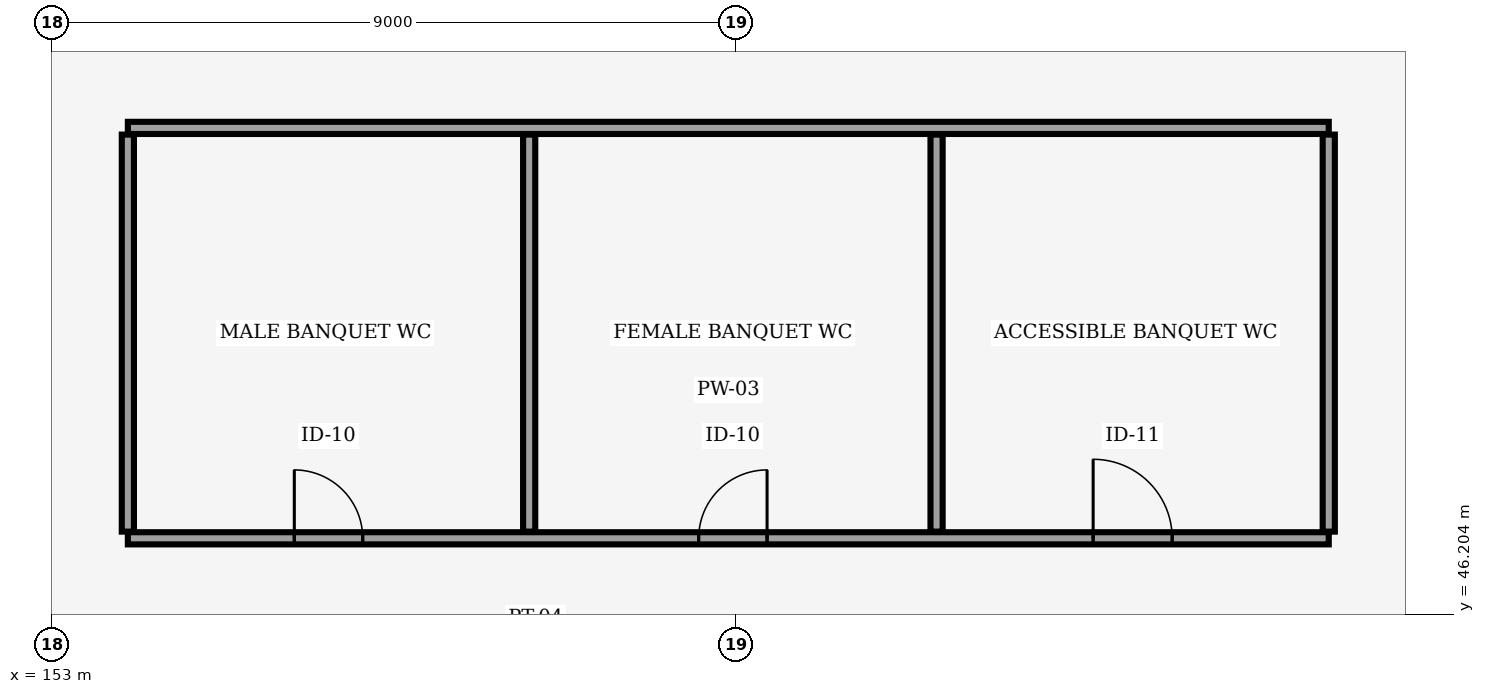
"""IFC4 building model, lengths in metres.
Left out: names, types, materials, properties, quantities, classifications, styles, units other than length and angle.
Written with IfcOpenShell. Run it as: python <this file> out.ifc"""

import sys

from ifc_helpers import new_model, si_unit, direction, frame, frame_2d, origin, place, context, subcontext, project, spatial, rectangle, extrude, element, fill, save


model = new_model("IFC4")
c1 = context("Model", 3, precision=1e-05, world=origin(), true_north=direction((0.0, 1.0)))
c2 = subcontext(c1, "Body", "Model", "MODEL_VIEW")
j1 = project(units=[si_unit("LENGTHUNIT", "METRE"), si_unit("PLANEANGLEUNIT", "RADIAN")], contexts=[c1])
p1 = place(None, origin())
s1 = spatial("IfcSite", under=j1, at=p1, CompositionType="ELEMENT")
p2 = place(p1, origin())
s2 = spatial("IfcBuilding", under=s1, at=p2, CompositionType="ELEMENT")
p3 = place(p2, frame((0.0, 0.0, 12.0)))
s3 = spatial("IfcBuildingStorey", under=s2, at=p3, CompositionType="ELEMENT", Elevation=12.0)
p4 = place(p3, frame((154.0, 47.2, 0.0), z_axis=(0.0, 0.0, 1.0), x_axis=(1.0, 0.0, 0.0)))
e1 = element("IfcWall", 1, at=p4, inside=s3, PredefinedType="PLUMBINGWALL", context=c2, shape_type="SweptSolid", body=[
    extrude(rectangle(XDim=15.8, YDim=0.16, at=frame_2d((7.9, 0.0))), origin(), (0.0, 0.0, 1.0), 4.75),
])
p5 = place(p4, frame((2.19, 0.0, 0.0)))
e2 = element("IfcOpeningElement", 2, at=p5, cuts=e1, PredefinedType="OPENING", context=c2, shape_type="SweptSolid", body=[
    extrude(rectangle(XDim=0.9, YDim=2.1, at=frame_2d((0.45, 1.05))), frame((0.0, 0.09, 0.0), z_axis=(0.0, -1.0, 0.0), x_axis=(1.0, 0.0, 0.0)), (0.0, 0.0, 1.0), 0.18),
])
p6 = place(p4, frame((7.51, 0.0, 0.0)))
e3 = element("IfcOpeningElement", 3, at=p6, cuts=e1, PredefinedType="OPENING", context=c2, shape_type="SweptSolid", body=[
    extrude(rectangle(XDim=0.9, YDim=2.1, at=frame_2d((0.45, 1.05))), frame((0.0, 0.09, 0.0), z_axis=(0.0, -1.0, 0.0), x_axis=(1.0, 0.0, 0.0)), (0.0, 0.0, 1.0), 0.18),
])
p7 = place(p4, frame((12.7, 0.0, 0.0)))
e4 = element("IfcOpeningElement", 4, at=p7, cuts=e1, PredefinedType="OPENING", context=c2, shape_type="SweptSolid", body=[
    extrude(rectangle(XDim=1.04, YDim=2.15, at=frame_2d((0.52, 1.075))), frame((0.0, 0.09, 0.0), z_axis=(0.0, -1.0, 0.0), x_axis=(1.0, 0.0, 0.0)), (0.0, 0.0, 1.0), 0.18),
])
p8 = place(p3, frame((154.0, 52.6, 0.0), z_axis=(0.0, 0.0, 1.0), x_axis=(1.0, 0.0, 0.0)))
e5 = element("IfcWall", 5, at=p8, inside=s3, PredefinedType="PLUMBINGWALL", context=c2, shape_type="SweptSolid", body=[
    extrude(rectangle(XDim=15.8, YDim=0.16, at=frame_2d((7.9, 0.0))), origin(), (0.0, 0.0, 1.0), 4.75),
])
for number, where, z_axis, x_axis in (
    (6, (154.0, 47.288, 0.0), (0.0, 0.0, 1.0), (0.0, 1.0, 0.0)),
    (7, (159.28, 47.288, 0.0), (0.0, 0.0, 1.0), (0.0, 1.0, 0.0)),
    (8, (164.64, 47.288, 0.0), (0.0, 0.0, 1.0), (0.0, 1.0, 0.0)),
    (9, (169.8, 47.288, 0.0), (0.0, 0.0, 1.0), (0.0, 1.0, 0.0)),
):
    element("IfcWall", number, at=place(p3, frame(where, z_axis=z_axis, x_axis=x_axis)), inside=s3, PredefinedType="PLUMBINGWALL", context=c2, shape_type="SweptSolid", body=[
        extrude(rectangle(XDim=5.224, YDim=0.16, at=frame_2d((2.612, 0.0))), origin(), (0.0, 0.0, 1.0), 4.75),
    ])
p9 = place(p5, origin())
e10 = element("IfcDoor", 10, at=p9, inside=s3, OperationType="SINGLE_SWING_LEFT", PredefinedType="DOOR", context=c2, shape_type="SweptSolid", body=[
    extrude(rectangle(XDim=0.9, YDim=2.1, at=frame_2d((0.45, 1.05))), frame((0.0, 0.025, 0.0), z_axis=(0.0, -1.0, 0.0), x_axis=(1.0, 0.0, 0.0)), (0.0, 0.0, 1.0), 0.05),
])
fill(e2, e10)
p10 = place(p6, origin())
e11 = element("IfcDoor", 11, at=p10, inside=s3, OperationType="SINGLE_SWING_RIGHT", PredefinedType="DOOR", context=c2, shape_type="SweptSolid", body=[
    extrude(rectangle(XDim=0.9, YDim=2.1, at=frame_2d((0.45, 1.05))), frame((0.0, 0.025, 0.0), z_axis=(0.0, -1.0, 0.0), x_axis=(1.0, 0.0, 0.0)), (0.0, 0.0, 1.0), 0.05),
])
fill(e3, e11)
p11 = place(p7, origin())
e12 = element("IfcDoor", 12, at=p11, inside=s3, OperationType="SINGLE_SWING_LEFT", PredefinedType="DOOR", context=c2, shape_type="SweptSolid", body=[
    extrude(rectangle(XDim=1.04, YDim=2.15, at=frame_2d((0.52, 1.075))), frame((0.0, 0.025, 0.0), z_axis=(0.0, -1.0, 0.0), x_axis=(1.0, 0.0, 0.0)), (0.0, 0.0, 1.0), 0.05),
])
fill(e4, e12)
save(model, sys.argv[1])
